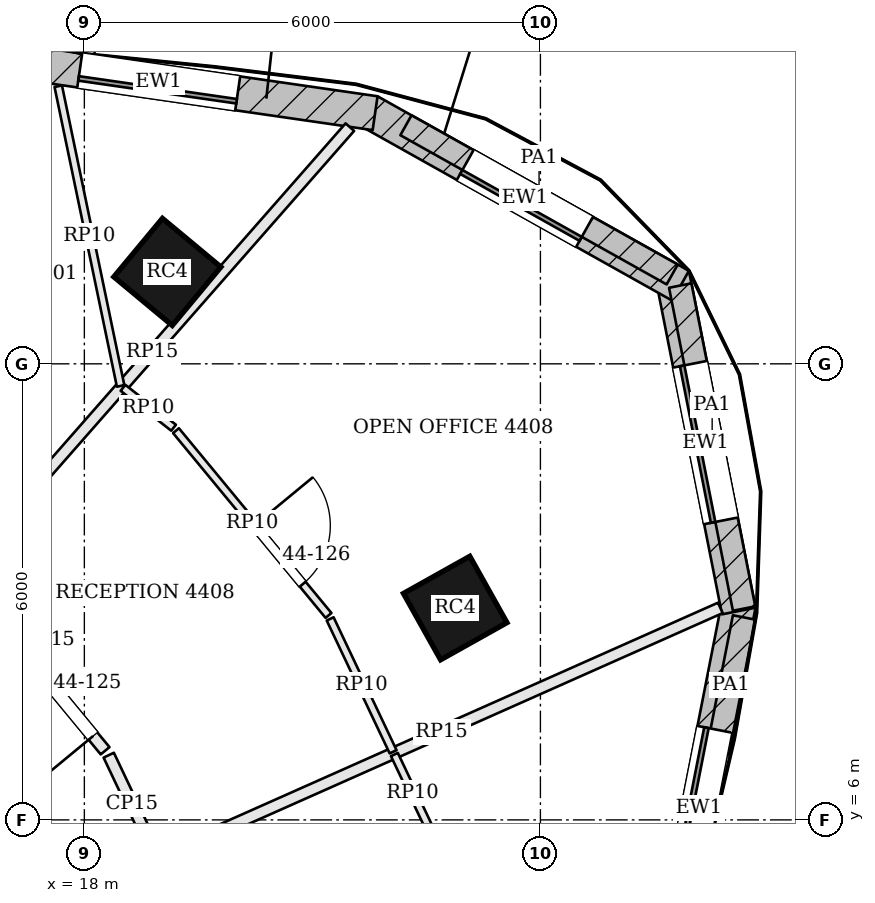
"""IFC4 building model, lengths in metres.
Left out: names, types, materials, properties, quantities, classifications, styles, units other than length and angle.
Written with IfcOpenShell. Run it as: python <this file> out.ifc"""

import sys

from ifc_helpers import new_model, si_unit, direction, frame, frame_2d, origin, origin_2d, place, context, subcontext, project, spatial, rectangle, extrude, element, fill, save


model = new_model("IFC4")
c1 = context("Model", 3, precision=1e-05, world=origin(), true_north=direction((0.0, 1.0)))
c2 = subcontext(c1, "Body", "Model", "MODEL_VIEW")
j1 = project(units=[si_unit("LENGTHUNIT", "METRE"), si_unit("PLANEANGLEUNIT", "RADIAN")], contexts=[c1])
p1 = place(None, origin())
s1 = spatial("IfcSite", under=j1, at=p1, CompositionType="ELEMENT")
p2 = place(p1, origin())
s2 = spatial("IfcBuilding", under=s1, at=p2, CompositionType="ELEMENT")
p3 = place(p2, frame((0.0, 0.0, 181.8)))
s3 = spatial("IfcBuildingStorey", under=s2, at=p3, CompositionType="ELEMENT", Elevation=181.8)
for number, where, z_axis, x_axis in (
    (1, (22.879, 8.787, 0.0), (0.0, 0.0, 1.0), (-0.489, 0.873, 0.0)),
    (2, (19.092, 13.209, 0.0), (0.0, 0.0, 1.0), (-0.769, 0.639, 0.0)),
):
    element("IfcColumn", number, at=place(p3, frame(where, z_axis=z_axis, x_axis=x_axis)), inside=s3, PredefinedType="COLUMN", context=c2, shape_type="SweptSolid", body=[
        extrude(rectangle(XDim=1.0, YDim=1.0, at=origin_2d()), origin(), (0.0, 0.0, 1.0), 3.9),
    ])
p4 = place(p3, frame((25.561, 3.49, 0.0), z_axis=(0.0, 0.0, 1.0), x_axis=(0.192494026297, 0.981298145234, 0.0)))
e3 = element("IfcWall", 3, at=p4, inside=s3, PredefinedType="SOLIDWALL", context=c2, shape_type="SweptSolid", body=[
    extrude(rectangle(XDim=5.446, YDim=0.45, at=frame_2d((2.723, 0.0))), origin(), (0.0, 0.0, 1.0), 3.7),
])
p5 = place(p4, frame((1.673, 0.0, 0.9)))
e4 = element("IfcOpeningElement", 4, at=p5, cuts=e3, PredefinedType="OPENING", context=c2, shape_type="SweptSolid", body=[
    extrude(rectangle(XDim=2.1, YDim=2.3, at=frame_2d((1.05, 1.15))), frame((0.0, 0.235, 0.0), z_axis=(0.0, -1.0, 0.0), x_axis=(1.0, 0.0, 0.0)), (0.0, 0.0, 1.0), 0.47),
])
p6 = place(p3, frame((26.61, 8.748, 0.0), z_axis=(0.0, 0.0, 1.0), x_axis=(-0.193923166402, 0.981016720312, 0.0)))
e5 = element("IfcWall", 5, at=p6, inside=s3, PredefinedType="SOLIDWALL", context=c2, shape_type="SweptSolid", body=[
    extrude(rectangle(XDim=4.518, YDim=0.45, at=frame_2d((2.259, 0.0))), origin(), (0.0, 0.0, 1.0), 3.7),
])
p7 = place(p6, frame((1.209, 0.0, 0.9)))
e6 = element("IfcOpeningElement", 6, at=p7, cuts=e5, PredefinedType="OPENING", context=c2, shape_type="SweptSolid", body=[
    extrude(rectangle(XDim=2.1, YDim=2.3, at=frame_2d((1.05, 1.15))), frame((0.0, 0.235, 0.0), z_axis=(0.0, -1.0, 0.0), x_axis=(1.0, 0.0, 0.0)), (0.0, 0.0, 1.0), 0.47),
])
p8 = place(p3, frame((25.844, 13.028, 0.0), z_axis=(0.0, 0.0, 1.0), x_axis=(-0.872346398261, 0.488888291373, 0.0)))
e7 = element("IfcWall", 7, at=p8, inside=s3, PredefinedType="SOLIDWALL", context=c2, shape_type="SweptSolid", body=[
    extrude(rectangle(XDim=4.696, YDim=0.45, at=frame_2d((2.348, 0.0))), origin(), (0.0, 0.0, 1.0), 3.7),
])
p9 = place(p8, frame((1.448, 0.0, 0.9)))
e8 = element("IfcOpeningElement", 8, at=p9, cuts=e7, PredefinedType="OPENING", context=c2, shape_type="SweptSolid", body=[
    extrude(rectangle(XDim=1.8, YDim=2.3, at=frame_2d((0.9, 1.15))), frame((0.0, 0.235, 0.0), z_axis=(0.0, -1.0, 0.0), x_axis=(1.0, 0.0, 0.0)), (0.0, 0.0, 1.0), 0.47),
])
p10 = place(p3, frame((21.825, 15.297, 0.0), z_axis=(0.0, 0.0, 1.0), x_axis=(-0.98971474215, 0.143054986527, 0.0)))
e9 = element("IfcWall", 9, at=p10, inside=s3, PredefinedType="SOLIDWALL", context=c2, shape_type="SweptSolid", body=[
    extrude(rectangle(XDim=5.753, YDim=0.45, at=frame_2d((2.876, 0.0))), origin(), (0.0, 0.0, 1.0), 3.7),
])
p11 = place(p10, frame((1.826, 0.0, 0.9)))
e10 = element("IfcOpeningElement", 10, at=p11, cuts=e9, PredefinedType="OPENING", context=c2, shape_type="SweptSolid", body=[
    extrude(rectangle(XDim=2.1, YDim=2.3, at=frame_2d((1.05, 1.15))), frame((0.0, 0.235, 0.0), z_axis=(0.0, -1.0, 0.0), x_axis=(1.0, 0.0, 0.0)), (0.0, 0.0, 1.0), 0.47),
])
p12 = place(p3, frame((26.332, 6.889, 3.9), z_axis=(0.0, 0.0, 1.0), x_axis=(0.192480725658, 0.981300754229, 0.0)))
e11 = element("IfcWall", 11, at=p12, inside=s3, PredefinedType="PARAPET", context=c2, shape_type="SweptSolid", body=[
    extrude(rectangle(XDim=1.809, YDim=0.3, at=frame_2d((0.904, 0.0))), origin(), (0.0, 0.0, 1.0), 1.1),
])
p13 = place(p3, frame((26.68, 8.78, 3.9), z_axis=(0.0, 0.0, 1.0), x_axis=(-0.193937094138, 0.981013967035, 0.0)))
e12 = element("IfcWall", 12, at=p13, inside=s3, PredefinedType="PARAPET", context=c2, shape_type="SweptSolid", body=[
    extrude(rectangle(XDim=4.332, YDim=0.3, at=frame_2d((2.166, 0.0))), origin(), (0.0, 0.0, 1.0), 1.1),
])
p14 = place(p3, frame((25.734, 13.176, 3.9), z_axis=(0.0, 0.0, 1.0), x_axis=(-0.872347343965, 0.488886603905, 0.0)))
e13 = element("IfcWall", 13, at=p14, inside=s3, PredefinedType="PARAPET", context=c2, shape_type="SweptSolid", body=[
    extrude(rectangle(XDim=4.016, YDim=0.3, at=frame_2d((2.008, 0.0))), origin(), (0.0, 0.0, 1.0), 1.1),
])
p15 = place(p3, frame((21.493, 15.114, 0.0), z_axis=(0.0, 0.0, 1.0), x_axis=(-0.659778549164, -0.751460089467, 0.0)))
e14 = element("IfcWall", 14, at=p15, inside=s3, PredefinedType="PARTITIONING", context=c2, shape_type="SweptSolid", body=[
    extrude(rectangle(XDim=7.877, YDim=0.15, at=frame_2d((3.938, 0.0))), origin(), (0.0, 0.0, 1.0), 3.234),
])
p16 = place(p3, frame((26.367, 8.789, 0.0), z_axis=(0.0, 0.0, 1.0), x_axis=(-0.913673557468, -0.406448804137, 0.0)))
e15 = element("IfcWall", 15, at=p16, inside=s3, PredefinedType="PARTITIONING", context=c2, shape_type="SweptSolid", body=[
    extrude(rectangle(XDim=8.029, YDim=0.15, at=frame_2d((4.014, 0.0))), origin(), (0.0, 0.0, 1.0), 3.234),
])
p17 = place(p3, frame((18.931, 5.563, 0.0), z_axis=(0.0, 0.0, 1.0), x_axis=(-0.428204145682, 0.903682029046, 0.0)))
e16 = element("IfcWall", 16, at=p17, inside=s3, PredefinedType="PARTITIONING", context=c2, shape_type="SweptSolid", body=[
    extrude(rectangle(XDim=1.425, YDim=0.15, at=frame_2d((0.713, 0.0))), origin(), (0.0, 0.0, 1.0), 3.084),
])
p18 = place(p3, frame((18.273, 6.909, 0.0), z_axis=(0.0, 0.0, 1.0), x_axis=(-0.63653648943, 0.771246586783, 0.0)))
e17 = element("IfcWall", 17, at=p18, inside=s3, PredefinedType="PARTITIONING", context=c2, shape_type="SweptSolid", body=[
    extrude(rectangle(XDim=2.342, YDim=0.15, at=frame_2d((1.171, 0.0))), origin(), (0.0, 0.0, 1.0), 3.084),
])
p19 = place(p18, frame((0.25, 0.0, 0.0)))
e18 = element("IfcOpeningElement", 18, at=p19, cuts=e17, PredefinedType="OPENING", context=c2, shape_type="SweptSolid", body=[
    extrude(rectangle(XDim=1.8, YDim=2.1, at=frame_2d((0.9, 1.05))), frame((0.0, 0.085, 0.0), z_axis=(0.0, -1.0, 0.0), x_axis=(1.0, 0.0, 0.0)), (0.0, 0.0, 1.0), 0.17),
])
p20 = place(p3, frame((17.656, 15.652, 0.0), z_axis=(0.0, 0.0, 1.0), x_axis=(0.203733969948, -0.979026286414, 0.0)))
e19 = element("IfcWall", 19, at=p20, inside=s3, PredefinedType="PARTITIONING", context=c2, shape_type="SweptSolid", body=[
    extrude(rectangle(XDim=4.028, YDim=0.1, at=frame_2d((2.014, 0.0))), origin(), (0.0, 0.0, 1.0), 3.084),
])
p21 = place(p3, frame((22.079, 6.86, 0.0), z_axis=(0.0, 0.0, 1.0), x_axis=(0.428105084675, -0.903728961844, 0.0)))
e20 = element("IfcWall", 20, at=p21, inside=s3, PredefinedType="PARTITIONING", context=c2, shape_type="SweptSolid", body=[
    extrude(rectangle(XDim=1.12, YDim=0.1, at=frame_2d((0.56, 0.0))), origin(), (0.0, 0.0, 1.0), 3.084),
])
p22 = place(p3, frame((18.508, 11.684, 0.0), z_axis=(0.0, 0.0, 1.0), x_axis=(0.785067093858, -0.619410734603, 0.0)))
e21 = element("IfcWall", 21, at=p22, inside=s3, PredefinedType="PARTITIONING", context=c2, shape_type="SweptSolid", body=[
    extrude(rectangle(XDim=0.847, YDim=0.1, at=frame_2d((0.424, 0.0))), origin(), (0.0, 0.0, 1.0), 3.084),
])
p23 = place(p3, frame((19.206, 11.121, 0.0), z_axis=(0.0, 0.0, 1.0), x_axis=(0.636597206989, -0.771196470462, 0.0)))
e22 = element("IfcWall", 22, at=p23, inside=s3, PredefinedType="PARTITIONING", context=c2, shape_type="SweptSolid", body=[
    extrude(rectangle(XDim=3.152, YDim=0.1, at=frame_2d((1.576, 0.0))), origin(), (0.0, 0.0, 1.0), 3.084),
])
p24 = place(p23, frame((1.619, 0.0, 0.0)))
e23 = element("IfcOpeningElement", 23, at=p24, cuts=e22, PredefinedType="OPENING", context=c2, shape_type="SweptSolid", body=[
    extrude(rectangle(XDim=1.0, YDim=2.1, at=frame_2d((0.5, 1.05))), frame((0.0, 0.06, 0.0), z_axis=(0.0, -1.0, 0.0), x_axis=(1.0, 0.0, 0.0)), (0.0, 0.0, 1.0), 0.12),
])
p25 = place(p3, frame((21.234, 8.644, 0.0), z_axis=(0.0, 0.0, 1.0), x_axis=(0.428183987328, -0.903691580682, 0.0)))
e24 = element("IfcWall", 24, at=p25, inside=s3, PredefinedType="PARTITIONING", context=c2, shape_type="SweptSolid", body=[
    extrude(rectangle(XDim=1.935, YDim=0.1, at=frame_2d((0.967, 0.0))), origin(), (0.0, 0.0, 1.0), 3.084),
])
p26 = place(p5, origin())
e25 = element("IfcWindow", 25, at=p26, inside=s3, PartitioningType="SINGLE_PANEL", PredefinedType="WINDOW", context=c2, shape_type="SweptSolid", body=[
    extrude(rectangle(XDim=2.1, YDim=2.3, at=frame_2d((1.05, 1.15))), frame((0.0, 0.135, 0.0), z_axis=(0.0, -1.0, 0.0), x_axis=(1.0, 0.0, 0.0)), (0.0, 0.0, 1.0), 0.06),
])
fill(e4, e25)
p27 = place(p7, origin())
e26 = element("IfcWindow", 26, at=p27, inside=s3, PartitioningType="SINGLE_PANEL", PredefinedType="WINDOW", context=c2, shape_type="SweptSolid", body=[
    extrude(rectangle(XDim=2.1, YDim=2.3, at=frame_2d((1.05, 1.15))), frame((0.0, 0.135, 0.0), z_axis=(0.0, -1.0, 0.0), x_axis=(1.0, 0.0, 0.0)), (0.0, 0.0, 1.0), 0.06),
])
fill(e6, e26)
p28 = place(p9, origin())
e27 = element("IfcWindow", 27, at=p28, inside=s3, PartitioningType="SINGLE_PANEL", PredefinedType="WINDOW", context=c2, shape_type="SweptSolid", body=[
    extrude(rectangle(XDim=1.8, YDim=2.3, at=frame_2d((0.9, 1.15))), frame((0.0, 0.135, 0.0), z_axis=(0.0, -1.0, 0.0), x_axis=(1.0, 0.0, 0.0)), (0.0, 0.0, 1.0), 0.06),
])
fill(e8, e27)
p29 = place(p11, origin())
e28 = element("IfcWindow", 28, at=p29, inside=s3, PartitioningType="SINGLE_PANEL", PredefinedType="WINDOW", context=c2, shape_type="SweptSolid", body=[
    extrude(rectangle(XDim=2.1, YDim=2.3, at=frame_2d((1.05, 1.15))), frame((0.0, 0.135, 0.0), z_axis=(0.0, -1.0, 0.0), x_axis=(1.0, 0.0, 0.0)), (0.0, 0.0, 1.0), 0.06),
])
fill(e10, e28)
p30 = place(p19, origin())
e29 = element("IfcDoor", 29, at=p30, inside=s3, OperationType="DOUBLE_DOOR_SINGLE_SWING", PredefinedType="DOOR", context=c2, shape_type="SweptSolid", body=[
    extrude(rectangle(XDim=1.8, YDim=2.1, at=frame_2d((0.9, 1.05))), frame((0.0, 0.025, 0.0), z_axis=(0.0, -1.0, 0.0), x_axis=(1.0, 0.0, 0.0)), (0.0, 0.0, 1.0), 0.05),
])
fill(e18, e29)
p31 = place(p24, origin())
e30 = element("IfcDoor", 30, at=p31, inside=s3, OperationType="SINGLE_SWING_LEFT", PredefinedType="DOOR", context=c2, shape_type="SweptSolid", body=[
    extrude(rectangle(XDim=1.0, YDim=2.1, at=frame_2d((0.5, 1.05))), frame((0.0, 0.025, 0.0), z_axis=(0.0, -1.0, 0.0), x_axis=(1.0, 0.0, 0.0)), (0.0, 0.0, 1.0), 0.05),
])
fill(e23, e30)
save(model, sys.argv[1])
